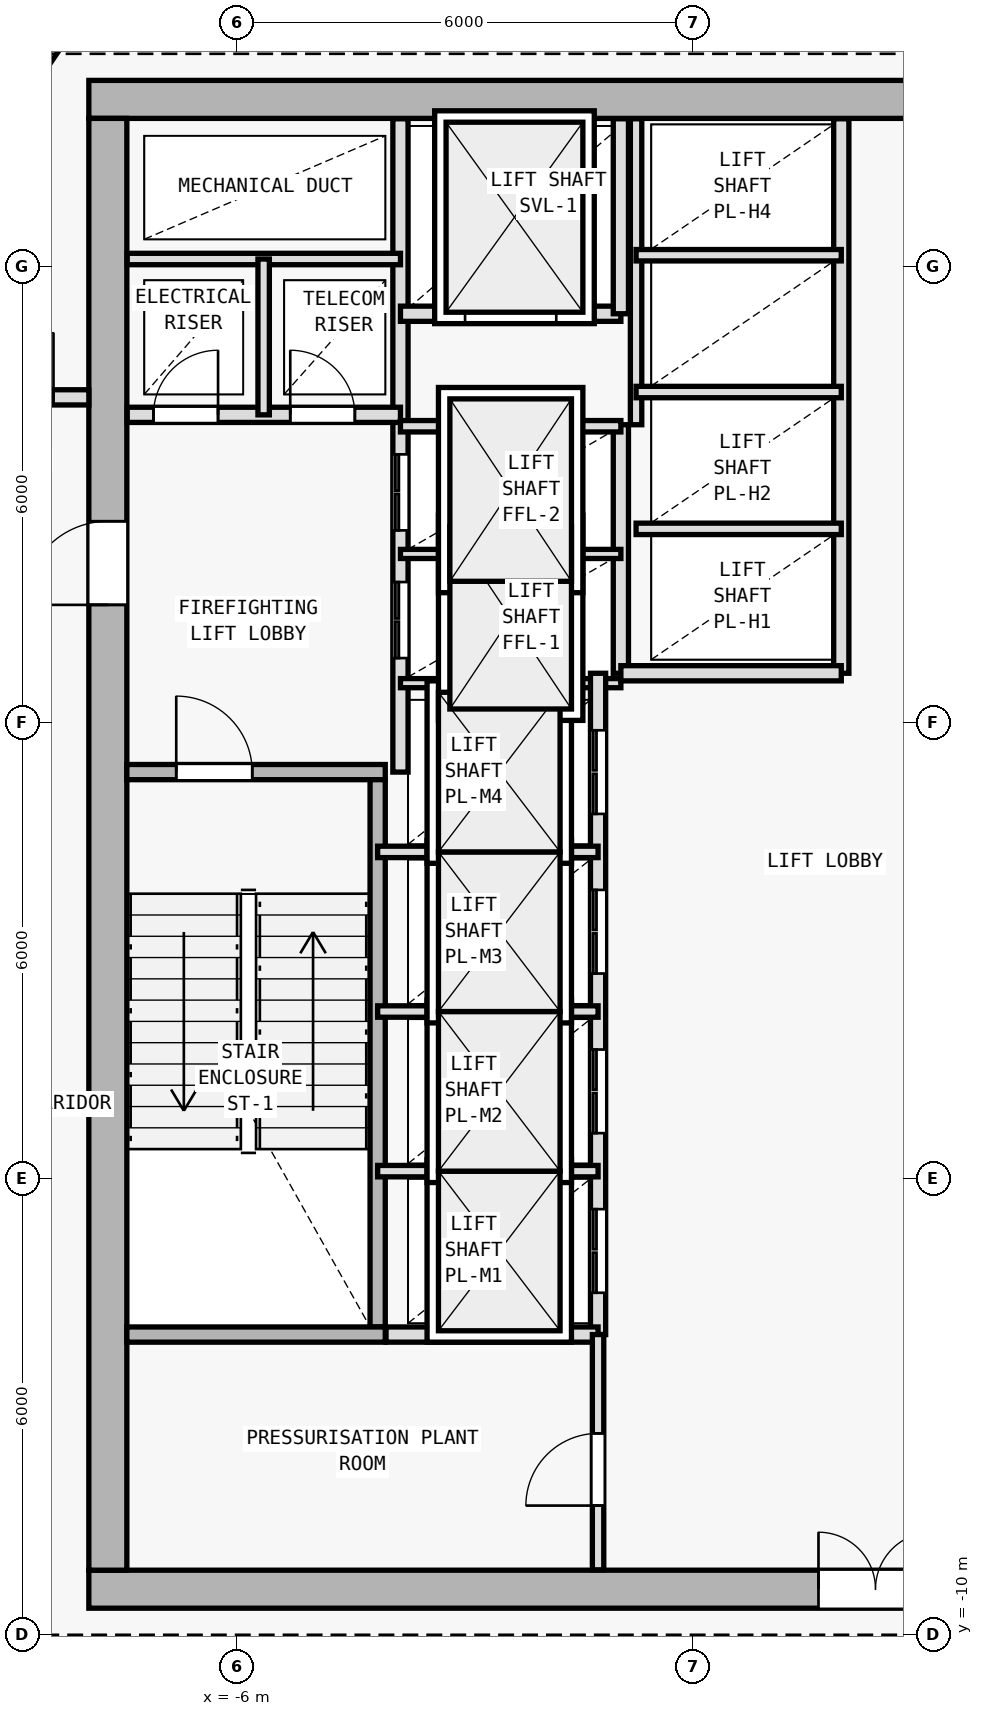
"""IFC4 building model, lengths in metres.
Left out: names, types, materials, properties, quantities, classifications, styles, units other than length and angle.
Written with IfcOpenShell. Run it as: python <this file> out.ifc"""

import sys

from ifc_helpers import new_model, si_unit, direction, frame, frame_2d, origin, origin_2d, place, context, subcontext, project, spatial, rectangle, i_section, extrude, element, fill, save


model = new_model("IFC4")
c1 = context("Model", 3, precision=1e-05, world=origin(), true_north=direction((0.0, 1.0)))
c2 = subcontext(c1, "Body", "Model", "MODEL_VIEW")
j1 = project(units=[si_unit("LENGTHUNIT", "METRE"), si_unit("PLANEANGLEUNIT", "RADIAN")], contexts=[c1])
p1 = place(None, origin())
s1 = spatial("IfcSite", under=j1, at=p1, CompositionType="ELEMENT")
p2 = place(p1, origin())
s2 = spatial("IfcBuilding", under=s1, at=p2, CompositionType="ELEMENT")
p3 = place(p2, frame((0.0, 0.0, 185.4)))
s3 = spatial("IfcBuildingStorey", under=s2, at=p3, CompositionType="ELEMENT", Elevation=185.4)
for number, where, z_axis, x_axis in (
    (1, (-7.7, -9.4, 0.0), (0.0, 0.0, 1.0), (1.0, 0.0, 0.0)),
    (2, (-7.7, 10.2, 0.0), (0.0, 0.0, 1.0), (1.0, 0.0, 0.0)),
    (3, (0.0, -9.4, 0.0), (0.0, 0.0, 1.0), (1.0, 0.0, 0.0)),
    (4, (-7.7, 2.0, 0.0), (0.0, 0.0, 1.0), (1.0, 0.0, 0.0)),
):
    element("IfcColumn", number, at=place(p3, frame(where, z_axis=z_axis, x_axis=x_axis)), inside=s3, PredefinedType="COLUMN", context=c2, shape_type="SweptSolid", body=[
        extrude(i_section(OverallWidth=0.404, OverallDepth=0.407, WebThickness=0.017, FlangeThickness=0.028, FilletRadius=0.015, at=origin_2d()), origin(), (0.0, 0.0, 1.0), 4.8),
    ])
p4 = place(p3, frame((-7.95, -9.4, 0.0), z_axis=(0.0, 0.0, 1.0), x_axis=(1.0, 0.0, 0.0)))
e5 = element("IfcWall", 5, at=p4, inside=s3, PredefinedType="SHEAR", context=c2, shape_type="SweptSolid", body=[
    extrude(rectangle(XDim=15.9, YDim=0.5, at=frame_2d((7.95, 0.0))), origin(), (0.0, 0.0, 1.0), 4.5),
])
p5 = place(p4, frame((9.6, 0.0, 0.0)))
e6 = element("IfcOpeningElement", 6, at=p5, cuts=e5, PredefinedType="OPENING", context=c2, shape_type="SweptSolid", body=[
    extrude(rectangle(XDim=1.5, YDim=2.2, at=frame_2d((0.75, 1.1))), frame((0.0, 0.26, 0.0), z_axis=(0.0, -1.0, 0.0), x_axis=(1.0, 0.0, 0.0)), (0.0, 0.0, 1.0), 0.52),
])
p6 = place(p3, frame((7.95, 10.2, 0.0), z_axis=(0.0, 0.0, 1.0), x_axis=(-1.0, 0.0, 0.0)))
e7 = element("IfcWall", 7, at=p6, inside=s3, PredefinedType="SHEAR", context=c2, shape_type="SweptSolid", body=[
    extrude(rectangle(XDim=15.9, YDim=0.5, at=frame_2d((7.95, 0.0))), origin(), (0.0, 0.0, 1.0), 4.5),
])
p7 = place(p3, frame((-7.7, -9.15, 0.0), z_axis=(0.0, 0.0, 1.0), x_axis=(0.0, 1.0, 0.0)))
e8 = element("IfcWall", 8, at=p7, inside=s3, PredefinedType="SHEAR", context=c2, shape_type="SweptSolid", body=[
    extrude(rectangle(XDim=19.1, YDim=0.5, at=frame_2d((9.55, 0.0))), origin(), (0.0, 0.0, 1.0), 4.5),
])
p8 = place(p7, frame((12.7, 0.0, 0.0)))
e9 = element("IfcOpeningElement", 9, at=p8, cuts=e8, PredefinedType="OPENING", context=c2, shape_type="SweptSolid", body=[
    extrude(rectangle(XDim=1.1, YDim=2.15, at=frame_2d((0.55, 1.075))), frame((0.0, 0.26, 0.0), z_axis=(0.0, -1.0, 0.0), x_axis=(1.0, 0.0, 0.0)), (0.0, 0.0, 1.0), 0.52),
])
p9 = place(p3, frame((-7.45, 1.35, 0.0), z_axis=(0.0, 0.0, 1.0), x_axis=(1.0, 0.0, 0.0)))
e10 = element("IfcWall", 10, at=p9, inside=s3, PredefinedType="SOLIDWALL", context=c2, shape_type="SweptSolid", body=[
    extrude(rectangle(XDim=3.4, YDim=0.2, at=frame_2d((1.7, 0.0))), origin(), (0.0, 0.0, 1.0), 4.5),
])
p10 = place(p9, frame((0.65, 0.0, 0.0)))
e11 = element("IfcOpeningElement", 11, at=p10, cuts=e10, PredefinedType="OPENING", context=c2, shape_type="SweptSolid", body=[
    extrude(rectangle(XDim=1.0, YDim=2.15, at=frame_2d((0.5, 1.075))), frame((0.0, 0.11, 0.0), z_axis=(0.0, -1.0, 0.0), x_axis=(1.0, 0.0, 0.0)), (0.0, 0.0, 1.0), 0.22),
])
p11 = place(p3, frame((-4.15, -5.95, 0.0), z_axis=(0.0, 0.0, 1.0), x_axis=(0.0, 1.0, 0.0)))
e12 = element("IfcWall", 12, at=p11, inside=s3, PredefinedType="SOLIDWALL", context=c2, shape_type="SweptSolid", body=[
    extrude(rectangle(XDim=7.2, YDim=0.2, at=frame_2d((3.6, 0.0))), origin(), (0.0, 0.0, 1.0), 4.5),
])
p12 = place(p3, frame((-3.85, 1.35, 0.0), z_axis=(0.0, 0.0, 1.0), x_axis=(0.0, 1.0, 0.0)))
e13 = element("IfcWall", 13, at=p12, inside=s3, PredefinedType="SOLIDWALL", context=c2, shape_type="SweptSolid", body=[
    extrude(rectangle(XDim=8.595, YDim=0.2, at=frame_2d((4.297, 0.0))), origin(), (0.0, 0.0, 1.0), 4.5),
])
p13 = place(p12, frame((1.5, 0.0, 0.0)))
e14 = element("IfcOpeningElement", 14, at=p13, cuts=e13, PredefinedType="OPENING", context=c2, shape_type="SweptSolid", body=[
    extrude(rectangle(XDim=1.0, YDim=2.15, at=frame_2d((0.5, 1.075))), frame((0.0, 0.11, 0.0), z_axis=(0.0, -1.0, 0.0), x_axis=(1.0, 0.0, 0.0)), (0.0, 0.0, 1.0), 0.22),
])
p14 = place(p12, frame((3.18, 0.0, 0.0)))
e15 = element("IfcOpeningElement", 15, at=p14, cuts=e13, PredefinedType="OPENING", context=c2, shape_type="SweptSolid", body=[
    extrude(rectangle(XDim=1.0, YDim=2.15, at=frame_2d((0.5, 1.075))), frame((0.0, 0.11, 0.0), z_axis=(0.0, -1.0, 0.0), x_axis=(1.0, 0.0, 0.0)), (0.0, 0.0, 1.0), 0.22),
])
p15 = place(p3, frame((-7.445, 6.05, 0.0), z_axis=(0.0, 0.0, 1.0), x_axis=(1.0, 0.0, 0.0)))
e16 = element("IfcWall", 16, at=p15, inside=s3, PredefinedType="SOLIDWALL", context=c2, shape_type="SweptSolid", body=[
    extrude(rectangle(XDim=3.595, YDim=0.2, at=frame_2d((1.797, 0.0))), origin(), (0.0, 0.0, 1.0), 4.5),
])
p16 = place(p15, frame((0.345, 0.0, 0.0)))
e17 = element("IfcOpeningElement", 17, at=p16, cuts=e16, PredefinedType="OPENING", context=c2, shape_type="SweptSolid", body=[
    extrude(rectangle(XDim=0.85, YDim=2.1, at=frame_2d((0.425, 1.05))), frame((0.0, 0.11, 0.0), z_axis=(0.0, -1.0, 0.0), x_axis=(1.0, 0.0, 0.0)), (0.0, 0.0, 1.0), 0.22),
])
p17 = place(p15, frame((2.145, 0.0, 0.0)))
e18 = element("IfcOpeningElement", 18, at=p17, cuts=e16, PredefinedType="OPENING", context=c2, shape_type="SweptSolid", body=[
    extrude(rectangle(XDim=0.85, YDim=2.1, at=frame_2d((0.425, 1.05))), frame((0.0, 0.11, 0.0), z_axis=(0.0, -1.0, 0.0), x_axis=(1.0, 0.0, 0.0)), (0.0, 0.0, 1.0), 0.22),
])
p18 = place(p3, frame((-7.445, 8.1, 0.0), z_axis=(0.0, 0.0, 1.0), x_axis=(1.0, 0.0, 0.0)))
e19 = element("IfcWall", 19, at=p18, inside=s3, PredefinedType="PARTITIONING", context=c2, shape_type="SweptSolid", body=[
    extrude(rectangle(XDim=3.595, YDim=0.15, at=frame_2d((1.797, 0.0))), origin(), (0.0, 0.0, 1.0), 4.5),
])
p19 = place(p3, frame((-5.65, 6.05, 0.0), z_axis=(0.0, 0.0, 1.0), x_axis=(0.0, 1.0, 0.0)))
e20 = element("IfcWall", 20, at=p19, inside=s3, PredefinedType="PARTITIONING", context=c2, shape_type="SweptSolid", body=[
    extrude(rectangle(XDim=2.05, YDim=0.15, at=frame_2d((1.025, 0.0))), origin(), (0.0, 0.0, 1.0), 4.5),
])
p20 = place(p3, frame((-0.95, 2.65, 0.0), z_axis=(0.0, 0.0, 1.0), x_axis=(0.0, 1.0, 0.0)))
e21 = element("IfcWall", 21, at=p20, inside=s3, PredefinedType="SOLIDWALL", context=c2, shape_type="SweptSolid", body=[
    extrude(rectangle(XDim=3.27, YDim=0.2, at=frame_2d((1.635, 0.0))), origin(), (0.0, 0.0, 1.0), 4.5),
])
for number, where, z_axis, x_axis in (
    (22, (-3.85, 2.52, 0.0), (0.0, 0.0, 1.0), (1.0, 0.0, 0.0)),
    (23, (-3.85, 4.22, 0.0), (0.0, 0.0, 1.0), (1.0, 0.0, 0.0)),
):
    element("IfcWall", number, at=place(p3, frame(where, z_axis=z_axis, x_axis=x_axis)), inside=s3, PredefinedType="PARTITIONING", context=c2, shape_type="SweptSolid", body=[
        extrude(rectangle(XDim=2.9, YDim=0.12, at=frame_2d((1.45, 0.0))), origin(), (0.0, 0.0, 1.0), 4.5),
    ])
p21 = place(p3, frame((-3.85, 5.9, 0.0), z_axis=(0.0, 0.0, 1.0), x_axis=(1.0, 0.0, 0.0)))
e24 = element("IfcWall", 24, at=p21, inside=s3, PredefinedType="PARTITIONING", context=c2, shape_type="SweptSolid", body=[
    extrude(rectangle(XDim=2.9, YDim=0.15, at=frame_2d((1.45, 0.0))), origin(), (0.0, 0.0, 1.0), 4.5),
])
p22 = place(p3, frame((-3.85, 7.38, 0.0), z_axis=(0.0, 0.0, 1.0), x_axis=(1.0, 0.0, 0.0)))
e25 = element("IfcWall", 25, at=p22, inside=s3, PredefinedType="SOLIDWALL", context=c2, shape_type="SweptSolid", body=[
    extrude(rectangle(XDim=2.9, YDim=0.2, at=frame_2d((1.45, 0.0))), origin(), (0.0, 0.0, 1.0), 4.5),
])
p23 = place(p22, frame((0.85, 0.0, 0.0)))
e26 = element("IfcOpeningElement", 26, at=p23, cuts=e25, PredefinedType="OPENING", context=c2, shape_type="SweptSolid", body=[
    extrude(rectangle(XDim=1.2, YDim=2.2, at=frame_2d((0.6, 1.1))), frame((0.0, 0.11, 0.0), z_axis=(0.0, -1.0, 0.0), x_axis=(1.0, 0.0, 0.0)), (0.0, 0.0, 1.0), 0.22),
])
p24 = place(p3, frame((-0.95, 7.38, 0.0), z_axis=(0.0, 0.0, 1.0), x_axis=(0.0, 1.0, 0.0)))
e27 = element("IfcWall", 27, at=p24, inside=s3, PredefinedType="SOLIDWALL", context=c2, shape_type="SweptSolid", body=[
    extrude(rectangle(XDim=2.565, YDim=0.2, at=frame_2d((1.283, 0.0))), origin(), (0.0, 0.0, 1.0), 4.5),
])
p25 = place(p3, frame((-1.25, -6.05, 0.0), z_axis=(0.0, 0.0, 1.0), x_axis=(0.0, 1.0, 0.0)))
e28 = element("IfcWall", 28, at=p25, inside=s3, PredefinedType="SOLIDWALL", context=c2, shape_type="SweptSolid", body=[
    extrude(rectangle(XDim=8.7, YDim=0.2, at=frame_2d((4.35, 0.0))), origin(), (0.0, 0.0, 1.0), 4.5),
])
p26 = place(p25, frame((0.55, 0.0, 0.0)))
e29 = element("IfcOpeningElement", 29, at=p26, cuts=e28, PredefinedType="OPENING", context=c2, shape_type="SweptSolid", body=[
    extrude(rectangle(XDim=1.1, YDim=2.15, at=frame_2d((0.55, 1.075))), frame((0.0, 0.11, 0.0), z_axis=(0.0, -1.0, 0.0), x_axis=(1.0, 0.0, 0.0)), (0.0, 0.0, 1.0), 0.22),
])
p27 = place(p25, frame((2.65, 0.0, 0.0)))
e30 = element("IfcOpeningElement", 30, at=p27, cuts=e28, PredefinedType="OPENING", context=c2, shape_type="SweptSolid", body=[
    extrude(rectangle(XDim=1.1, YDim=2.15, at=frame_2d((0.55, 1.075))), frame((0.0, 0.11, 0.0), z_axis=(0.0, -1.0, 0.0), x_axis=(1.0, 0.0, 0.0)), (0.0, 0.0, 1.0), 0.22),
])
p28 = place(p25, frame((4.75, 0.0, 0.0)))
e31 = element("IfcOpeningElement", 31, at=p28, cuts=e28, PredefinedType="OPENING", context=c2, shape_type="SweptSolid", body=[
    extrude(rectangle(XDim=1.1, YDim=2.15, at=frame_2d((0.55, 1.075))), frame((0.0, 0.11, 0.0), z_axis=(0.0, -1.0, 0.0), x_axis=(1.0, 0.0, 0.0)), (0.0, 0.0, 1.0), 0.22),
])
p29 = place(p25, frame((6.85, 0.0, 0.0)))
e32 = element("IfcOpeningElement", 32, at=p29, cuts=e28, PredefinedType="OPENING", context=c2, shape_type="SweptSolid", body=[
    extrude(rectangle(XDim=1.1, YDim=2.15, at=frame_2d((0.55, 1.075))), frame((0.0, 0.11, 0.0), z_axis=(0.0, -1.0, 0.0), x_axis=(1.0, 0.0, 0.0)), (0.0, 0.0, 1.0), 0.22),
])
for number, where, z_axis, x_axis in (
    (33, (-4.15, -3.9, 0.0), (0.0, 0.0, 1.0), (1.0, 0.0, 0.0)),
    (34, (-4.15, -1.8, 0.0), (0.0, 0.0, 1.0), (1.0, 0.0, 0.0)),
    (35, (-4.15, 0.3, 0.0), (0.0, 0.0, 1.0), (1.0, 0.0, 0.0)),
):
    element("IfcWall", number, at=place(p3, frame(where, z_axis=z_axis, x_axis=x_axis)), inside=s3, PredefinedType="PARTITIONING", context=c2, shape_type="SweptSolid", body=[
        extrude(rectangle(XDim=2.9, YDim=0.15, at=frame_2d((1.45, 0.0))), origin(), (0.0, 0.0, 1.0), 4.5),
    ])
p30 = place(p3, frame((1.95, 2.65, 0.0), z_axis=(0.0, 0.0, 1.0), x_axis=(0.0, 1.0, 0.0)))
e36 = element("IfcWall", 36, at=p30, inside=s3, PredefinedType="SOLIDWALL", context=c2, shape_type="SweptSolid", body=[
    extrude(rectangle(XDim=7.295, YDim=0.2, at=frame_2d((3.647, 0.0))), origin(), (0.0, 0.0, 1.0), 4.5),
])
p31 = place(p3, frame((-0.95, 2.65, 0.0), z_axis=(0.0, 0.0, 1.0), x_axis=(1.0, 0.0, 0.0)))
e37 = element("IfcWall", 37, at=p31, inside=s3, PredefinedType="SOLIDWALL", context=c2, shape_type="SweptSolid", body=[
    extrude(rectangle(XDim=2.9, YDim=0.2, at=frame_2d((1.45, 0.0))), origin(), (0.0, 0.0, 1.0), 4.5),
])
p32 = place(p3, frame((-0.75, 5.92, 0.0), z_axis=(0.0, 0.0, 1.0), x_axis=(0.0, 1.0, 0.0)))
e38 = element("IfcWall", 38, at=p32, inside=s3, PredefinedType="PARTITIONING", context=c2, shape_type="SweptSolid", body=[
    extrude(rectangle(XDim=4.025, YDim=0.15, at=frame_2d((2.013, 0.0))), origin(), (0.0, 0.0, 1.0), 4.5),
])
for number, where, z_axis, x_axis in (
    (39, (-0.75, 4.55, 0.0), (0.0, 0.0, 1.0), (1.0, 0.0, 0.0)),
    (40, (-0.75, 6.35, 0.0), (0.0, 0.0, 1.0), (1.0, 0.0, 0.0)),
    (41, (-0.75, 8.15, 0.0), (0.0, 0.0, 1.0), (1.0, 0.0, 0.0)),
):
    element("IfcWall", number, at=place(p3, frame(where, z_axis=z_axis, x_axis=x_axis)), inside=s3, PredefinedType="PARTITIONING", context=c2, shape_type="SweptSolid", body=[
        extrude(rectangle(XDim=2.7, YDim=0.15, at=frame_2d((1.35, 0.0))), origin(), (0.0, 0.0, 1.0), 4.5),
    ])
p33 = place(p3, frame((-7.45, -6.05, 0.0), z_axis=(0.0, 0.0, 1.0), x_axis=(1.0, 0.0, 0.0)))
e42 = element("IfcWall", 42, at=p33, inside=s3, PredefinedType="SOLIDWALL", context=c2, shape_type="SweptSolid", body=[
    extrude(rectangle(XDim=3.4, YDim=0.2, at=frame_2d((1.7, 0.0))), origin(), (0.0, 0.0, 1.0), 4.5),
])
p34 = place(p3, frame((-4.04, -6.05, 0.0), z_axis=(0.0, 0.0, 1.0), x_axis=(1.0, 0.0, 0.0)))
e43 = element("IfcWall", 43, at=p34, inside=s3, PredefinedType="SOLIDWALL", context=c2, shape_type="SweptSolid", body=[
    extrude(rectangle(XDim=2.79, YDim=0.2, at=frame_2d((1.395, 0.0))), origin(), (0.0, 0.0, 1.0), 4.5),
])
p35 = place(p3, frame((-1.25, -9.145, 0.0), z_axis=(0.0, 0.0, 1.0), x_axis=(0.0, 1.0, 0.0)))
e44 = element("IfcWall", 44, at=p35, inside=s3, PredefinedType="PARTITIONING", context=c2, shape_type="SweptSolid", body=[
    extrude(rectangle(XDim=3.095, YDim=0.15, at=frame_2d((1.547, 0.0))), origin(), (0.0, 0.0, 1.0), 4.5),
])
p36 = place(p35, frame((0.845, 0.0, 0.0)))
e45 = element("IfcOpeningElement", 45, at=p36, cuts=e44, PredefinedType="OPENING", context=c2, shape_type="SweptSolid", body=[
    extrude(rectangle(XDim=0.95, YDim=2.1, at=frame_2d((0.475, 1.05))), frame((0.0, 0.085, 0.0), z_axis=(0.0, -1.0, 0.0), x_axis=(1.0, 0.0, 0.0)), (0.0, 0.0, 1.0), 0.17),
])
p37 = place(p3, frame((-13.39, 3.558, 0.0), z_axis=(0.0, 0.0, 1.0), x_axis=(0.562463299975, 0.826822251867, 0.0)))
e46 = element("IfcWall", 46, at=p37, inside=s3, PredefinedType="PARTITIONING", context=c2, shape_type="SweptSolid", body=[
    extrude(rectangle(XDim=12.198, YDim=0.15, at=frame_2d((6.099, 0.0))), origin(), (0.0, 0.0, 1.0), 4.085),
])
p38 = place(p3, frame((-9.83, 6.28, 0.0), z_axis=(0.0, 0.0, 1.0), x_axis=(1.0, 0.0, 0.0)))
e47 = element("IfcWall", 47, at=p38, inside=s3, PredefinedType="SOLIDWALL", context=c2, shape_type="SweptSolid", body=[
    extrude(rectangle(XDim=1.88, YDim=0.2, at=frame_2d((0.94, 0.0))), origin(), (0.0, 0.0, 1.0), 4.5),
])
p39 = place(p38, frame((0.565, 0.0, 0.0)))
e48 = element("IfcOpeningElement", 48, at=p39, cuts=e47, PredefinedType="OPENING", context=c2, shape_type="SweptSolid", body=[
    extrude(rectangle(XDim=0.85, YDim=2.1, at=frame_2d((0.425, 1.05))), frame((0.0, 0.11, 0.0), z_axis=(0.0, -1.0, 0.0), x_axis=(1.0, 0.0, 0.0)), (0.0, 0.0, 1.0), 0.22),
])
p40 = place(p5, origin())
e49 = element("IfcDoor", 49, at=p40, inside=s3, OperationType="DOUBLE_DOOR_SINGLE_SWING", PredefinedType="DOOR", context=c2, shape_type="SweptSolid", body=[
    extrude(rectangle(XDim=1.5, YDim=2.2, at=frame_2d((0.75, 1.1))), frame((0.0, 0.025, 0.0), z_axis=(0.0, -1.0, 0.0), x_axis=(1.0, 0.0, 0.0)), (0.0, 0.0, 1.0), 0.05),
])
fill(e6, e49)
p41 = place(p8, origin())
e50 = element("IfcDoor", 50, at=p41, inside=s3, OperationType="SINGLE_SWING_LEFT", PredefinedType="DOOR", context=c2, shape_type="SweptSolid", body=[
    extrude(rectangle(XDim=1.1, YDim=2.15, at=frame_2d((0.55, 1.075))), frame((0.0, 0.025, 0.0), z_axis=(0.0, -1.0, 0.0), x_axis=(1.0, 0.0, 0.0)), (0.0, 0.0, 1.0), 0.05),
])
fill(e9, e50)
p42 = place(p10, origin())
e51 = element("IfcDoor", 51, at=p42, inside=s3, OperationType="SINGLE_SWING_LEFT", PredefinedType="DOOR", context=c2, shape_type="SweptSolid", body=[
    extrude(rectangle(XDim=1.0, YDim=2.15, at=frame_2d((0.5, 1.075))), frame((0.0, 0.025, 0.0), z_axis=(0.0, -1.0, 0.0), x_axis=(1.0, 0.0, 0.0)), (0.0, 0.0, 1.0), 0.05),
])
fill(e11, e51)
p43 = place(p16, origin())
e52 = element("IfcDoor", 52, at=p43, inside=s3, OperationType="SINGLE_SWING_RIGHT", PredefinedType="DOOR", context=c2, shape_type="SweptSolid", body=[
    extrude(rectangle(XDim=0.85, YDim=2.1, at=frame_2d((0.425, 1.05))), frame((0.0, 0.025, 0.0), z_axis=(0.0, -1.0, 0.0), x_axis=(1.0, 0.0, 0.0)), (0.0, 0.0, 1.0), 0.05),
])
fill(e17, e52)
p44 = place(p17, origin())
e53 = element("IfcDoor", 53, at=p44, inside=s3, OperationType="SINGLE_SWING_LEFT", PredefinedType="DOOR", context=c2, shape_type="SweptSolid", body=[
    extrude(rectangle(XDim=0.85, YDim=2.1, at=frame_2d((0.425, 1.05))), frame((0.0, 0.025, 0.0), z_axis=(0.0, -1.0, 0.0), x_axis=(1.0, 0.0, 0.0)), (0.0, 0.0, 1.0), 0.05),
])
fill(e18, e53)
p45 = place(p23, origin())
e54 = element("IfcDoor", 54, at=p45, inside=s3, OperationType="DOUBLE_DOOR_SLIDING", PredefinedType="DOOR", context=c2, shape_type="SweptSolid", body=[
    extrude(rectangle(XDim=1.2, YDim=2.2, at=frame_2d((0.6, 1.1))), frame((0.0, 0.025, 0.0), z_axis=(0.0, -1.0, 0.0), x_axis=(1.0, 0.0, 0.0)), (0.0, 0.0, 1.0), 0.05),
])
fill(e26, e54)
p46 = place(p26, origin())
e55 = element("IfcDoor", 55, at=p46, inside=s3, OperationType="DOUBLE_DOOR_SLIDING", PredefinedType="DOOR", context=c2, shape_type="SweptSolid", body=[
    extrude(rectangle(XDim=1.1, YDim=2.15, at=frame_2d((0.55, 1.075))), frame((0.0, 0.025, 0.0), z_axis=(0.0, -1.0, 0.0), x_axis=(1.0, 0.0, 0.0)), (0.0, 0.0, 1.0), 0.05),
])
fill(e29, e55)
p47 = place(p27, origin())
e56 = element("IfcDoor", 56, at=p47, inside=s3, OperationType="DOUBLE_DOOR_SLIDING", PredefinedType="DOOR", context=c2, shape_type="SweptSolid", body=[
    extrude(rectangle(XDim=1.1, YDim=2.15, at=frame_2d((0.55, 1.075))), frame((0.0, 0.025, 0.0), z_axis=(0.0, -1.0, 0.0), x_axis=(1.0, 0.0, 0.0)), (0.0, 0.0, 1.0), 0.05),
])
fill(e30, e56)
p48 = place(p28, origin())
e57 = element("IfcDoor", 57, at=p48, inside=s3, OperationType="DOUBLE_DOOR_SLIDING", PredefinedType="DOOR", context=c2, shape_type="SweptSolid", body=[
    extrude(rectangle(XDim=1.1, YDim=2.15, at=frame_2d((0.55, 1.075))), frame((0.0, 0.025, 0.0), z_axis=(0.0, -1.0, 0.0), x_axis=(1.0, 0.0, 0.0)), (0.0, 0.0, 1.0), 0.05),
])
fill(e31, e57)
p49 = place(p29, origin())
e58 = element("IfcDoor", 58, at=p49, inside=s3, OperationType="DOUBLE_DOOR_SLIDING", PredefinedType="DOOR", context=c2, shape_type="SweptSolid", body=[
    extrude(rectangle(XDim=1.1, YDim=2.15, at=frame_2d((0.55, 1.075))), frame((0.0, 0.025, 0.0), z_axis=(0.0, -1.0, 0.0), x_axis=(1.0, 0.0, 0.0)), (0.0, 0.0, 1.0), 0.05),
])
fill(e32, e58)
p50 = place(p13, origin())
e59 = element("IfcDoor", 59, at=p50, inside=s3, OperationType="DOUBLE_DOOR_SLIDING", PredefinedType="DOOR", context=c2, shape_type="SweptSolid", body=[
    extrude(rectangle(XDim=1.0, YDim=2.15, at=frame_2d((0.5, 1.075))), frame((0.0, 0.025, 0.0), z_axis=(0.0, -1.0, 0.0), x_axis=(1.0, 0.0, 0.0)), (0.0, 0.0, 1.0), 0.05),
])
fill(e14, e59)
p51 = place(p14, origin())
e60 = element("IfcDoor", 60, at=p51, inside=s3, OperationType="DOUBLE_DOOR_SLIDING", PredefinedType="DOOR", context=c2, shape_type="SweptSolid", body=[
    extrude(rectangle(XDim=1.0, YDim=2.15, at=frame_2d((0.5, 1.075))), frame((0.0, 0.025, 0.0), z_axis=(0.0, -1.0, 0.0), x_axis=(1.0, 0.0, 0.0)), (0.0, 0.0, 1.0), 0.05),
])
fill(e15, e60)
p52 = place(p36, origin())
e61 = element("IfcDoor", 61, at=p52, inside=s3, OperationType="SINGLE_SWING_LEFT", PredefinedType="DOOR", context=c2, shape_type="SweptSolid", body=[
    extrude(rectangle(XDim=0.95, YDim=2.1, at=frame_2d((0.475, 1.05))), frame((0.0, 0.025, 0.0), z_axis=(0.0, -1.0, 0.0), x_axis=(1.0, 0.0, 0.0)), (0.0, 0.0, 1.0), 0.05),
])
fill(e45, e61)
p53 = place(p39, origin())
e62 = element("IfcDoor", 62, at=p53, inside=s3, OperationType="SINGLE_SWING_RIGHT", PredefinedType="DOOR", context=c2, shape_type="SweptSolid", body=[
    extrude(rectangle(XDim=0.85, YDim=2.1, at=frame_2d((0.425, 1.05))), frame((0.0, 0.025, 0.0), z_axis=(0.0, -1.0, 0.0), x_axis=(1.0, 0.0, 0.0)), (0.0, 0.0, 1.0), 0.05),
])
fill(e48, e62)
save(model, sys.argv[1])
